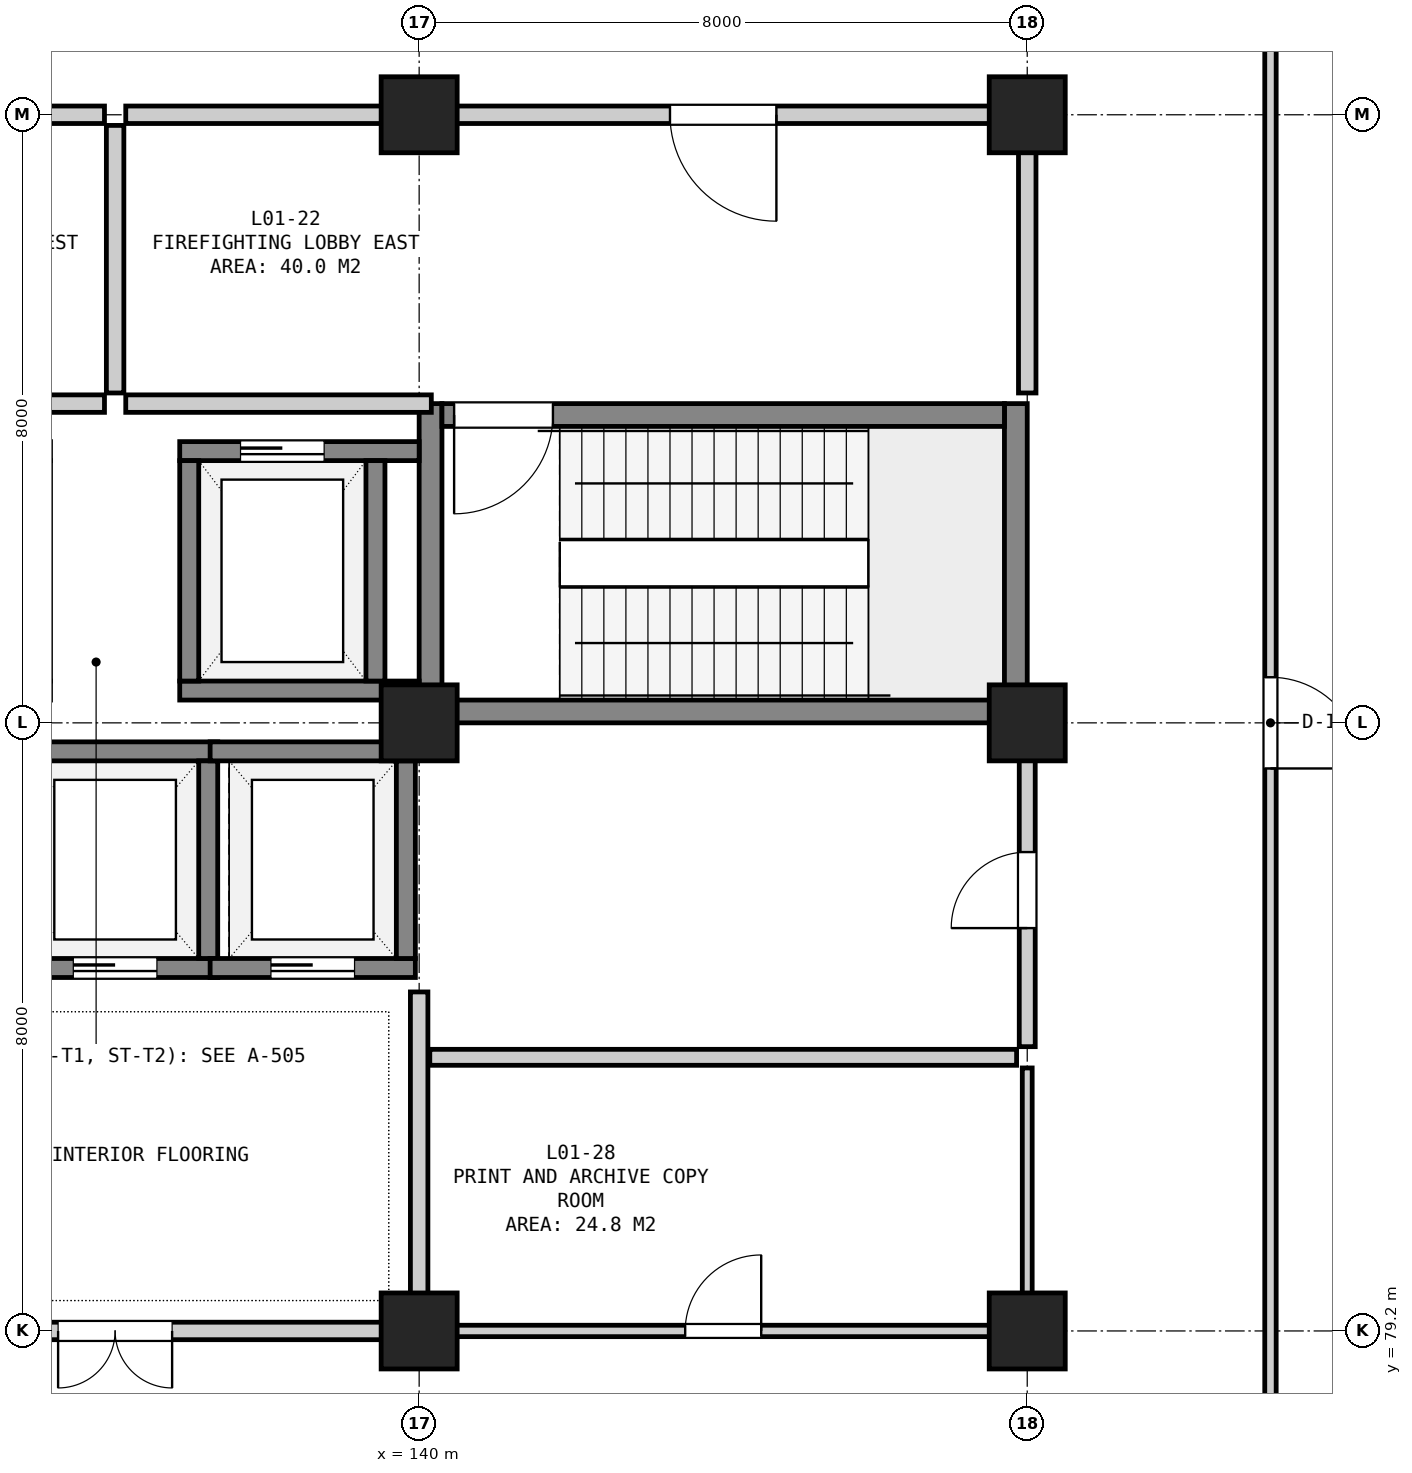
"""IFC4 building model, lengths in metres.
Left out: names, types, materials, properties, quantities, classifications, styles, units other than length and angle.
Written with IfcOpenShell. Run it as: python <this file> out.ifc"""

import sys

from ifc_helpers import new_model, si_unit, direction, frame, frame_2d, origin, origin_2d, place, context, subcontext, project, spatial, rectangle, extrude, element, fill, save


model = new_model("IFC4")
c1 = context("Model", 3, precision=1e-05, world=origin(), true_north=direction((0.0, 1.0)))
c2 = subcontext(c1, "Body", "Model", "MODEL_VIEW")
j1 = project(units=[si_unit("LENGTHUNIT", "METRE"), si_unit("PLANEANGLEUNIT", "RADIAN")], contexts=[c1])
p1 = place(None, origin())
s1 = spatial("IfcSite", under=j1, at=p1, CompositionType="ELEMENT")
p2 = place(p1, origin())
s2 = spatial("IfcBuilding", under=s1, at=p2, CompositionType="ELEMENT")
p3 = place(p2, frame((0.0, 0.0, 5.4)))
s3 = spatial("IfcBuildingStorey", under=s2, at=p3, CompositionType="ELEMENT", Elevation=5.4)
for number, where, z_axis, x_axis in (
    (1, (140.0, 79.2, 0.0), (0.0, 0.0, 1.0), (1.0, 0.0, 0.0)),
    (2, (140.0, 87.2, 0.0), (0.0, 0.0, 1.0), (1.0, 0.0, 0.0)),
    (3, (140.0, 95.2, 0.0), (0.0, 0.0, 1.0), (1.0, 0.0, 0.0)),
    (4, (148.0, 79.2, 0.0), (0.0, 0.0, 1.0), (1.0, 0.0, 0.0)),
    (5, (148.0, 87.2, 0.0), (0.0, 0.0, 1.0), (1.0, 0.0, 0.0)),
    (6, (148.0, 95.2, 0.0), (0.0, 0.0, 1.0), (1.0, 0.0, 0.0)),
):
    element("IfcColumn", number, at=place(p3, frame(where, z_axis=z_axis, x_axis=x_axis)), inside=s3, PredefinedType="COLUMN", context=c2, shape_type="SweptSolid", body=[
        extrude(rectangle(XDim=1.0, YDim=1.0, at=origin_2d()), origin(), (0.0, 0.0, 1.0), 5.4),
    ])
for number, where, z_axis, x_axis in (
    (7, (140.15, 87.2, 0.0), (0.0, 0.0, 1.0), (0.0, 1.0, 0.0)),
    (8, (147.85, 87.2, 0.0), (0.0, 0.0, 1.0), (0.0, 1.0, 0.0)),
):
    element("IfcWall", number, at=place(p3, frame(where, z_axis=z_axis, x_axis=x_axis)), inside=s3, PredefinedType="SHEAR", context=c2, shape_type="SweptSolid", body=[
        extrude(rectangle(XDim=4.2, YDim=0.3, at=frame_2d((2.1, 0.0))), origin(), (0.0, 0.0, 1.0), 5.1),
    ])
p4 = place(p3, frame((140.3, 87.35, 0.0), z_axis=(0.0, 0.0, 1.0), x_axis=(1.0, 0.0, 0.0)))
e9 = element("IfcWall", 9, at=p4, inside=s3, PredefinedType="SHEAR", context=c2, shape_type="SweptSolid", body=[
    extrude(rectangle(XDim=7.4, YDim=0.3, at=frame_2d((3.7, 0.0))), origin(), (0.0, 0.0, 1.0), 5.1),
])
p5 = place(p3, frame((140.3, 91.25, 0.0), z_axis=(0.0, 0.0, 1.0), x_axis=(1.0, 0.0, 0.0)))
e10 = element("IfcWall", 10, at=p5, inside=s3, PredefinedType="SHEAR", context=c2, shape_type="SweptSolid", body=[
    extrude(rectangle(XDim=7.4, YDim=0.3, at=frame_2d((3.7, 0.0))), origin(), (0.0, 0.0, 1.0), 5.1),
])
p6 = place(p5, frame((0.16, 0.0, 0.0)))
e11 = element("IfcOpeningElement", 11, at=p6, cuts=e10, PredefinedType="OPENING", context=c2, shape_type="SweptSolid", body=[
    extrude(rectangle(XDim=1.3, YDim=2.18, at=frame_2d((0.65, 1.09))), frame((0.0, 0.162, 0.0), z_axis=(0.0, -1.0, 0.0), x_axis=(1.0, 0.0, 0.0)), (0.0, 0.0, 1.0), 0.324),
])
p7 = place(p3, frame((136.85, 87.625, 0.0), z_axis=(0.0, 0.0, 1.0), x_axis=(1.0, 0.0, 0.0)))
e12 = element("IfcWall", 12, at=p7, inside=s3, PredefinedType="SHEAR", context=c2, shape_type="SweptSolid", body=[
    extrude(rectangle(XDim=3.15, YDim=0.25, at=frame_2d((1.575, 0.0))), origin(), (0.0, 0.0, 1.0), 5.1),
])
p8 = place(p3, frame((136.85, 90.775, 0.0), z_axis=(0.0, 0.0, 1.0), x_axis=(1.0, 0.0, 0.0)))
e13 = element("IfcWall", 13, at=p8, inside=s3, PredefinedType="SHEAR", context=c2, shape_type="SweptSolid", body=[
    extrude(rectangle(XDim=3.15, YDim=0.25, at=frame_2d((1.575, 0.0))), origin(), (0.0, 0.0, 1.0), 5.1),
])
p9 = place(p8, frame((0.8, 0.0, 0.0)))
e14 = element("IfcOpeningElement", 14, at=p9, cuts=e13, PredefinedType="OPENING", context=c2, shape_type="SweptSolid", body=[
    extrude(rectangle(XDim=1.1, YDim=2.15, at=frame_2d((0.55, 1.075))), frame((0.0, 0.137, 0.0), z_axis=(0.0, -1.0, 0.0), x_axis=(1.0, 0.0, 0.0)), (0.0, 0.0, 1.0), 0.274),
])
for number, where, z_axis, x_axis in (
    (15, (136.975, 87.75, 0.0), (0.0, 0.0, 1.0), (0.0, 1.0, 0.0)),
    (16, (139.425, 87.75, 0.0), (0.0, 0.0, 1.0), (0.0, 1.0, 0.0)),
):
    element("IfcWall", number, at=place(p3, frame(where, z_axis=z_axis, x_axis=x_axis)), inside=s3, PredefinedType="SHEAR", context=c2, shape_type="SweptSolid", body=[
        extrude(rectangle(XDim=2.9, YDim=0.25, at=frame_2d((1.45, 0.0))), origin(), (0.0, 0.0, 1.0), 5.1),
    ])
p10 = place(p3, frame((134.65, 83.975, 0.0), z_axis=(0.0, 0.0, 1.0), x_axis=(1.0, 0.0, 0.0)))
e17 = element("IfcWall", 17, at=p10, inside=s3, PredefinedType="SHEAR", context=c2, shape_type="SweptSolid", body=[
    extrude(rectangle(XDim=2.7, YDim=0.25, at=frame_2d((1.35, 0.0))), origin(), (0.0, 0.0, 1.0), 5.1),
])
p11 = place(p10, frame((0.8, 0.0, 0.0)))
e18 = element("IfcOpeningElement", 18, at=p11, cuts=e17, PredefinedType="OPENING", context=c2, shape_type="SweptSolid", body=[
    extrude(rectangle(XDim=1.1, YDim=2.15, at=frame_2d((0.55, 1.075))), frame((0.0, 0.137, 0.0), z_axis=(0.0, -1.0, 0.0), x_axis=(1.0, 0.0, 0.0)), (0.0, 0.0, 1.0), 0.274),
])
p12 = place(p3, frame((134.65, 86.825, 0.0), z_axis=(0.0, 0.0, 1.0), x_axis=(1.0, 0.0, 0.0)))
e19 = element("IfcWall", 19, at=p12, inside=s3, PredefinedType="SHEAR", context=c2, shape_type="SweptSolid", body=[
    extrude(rectangle(XDim=2.7, YDim=0.25, at=frame_2d((1.35, 0.0))), origin(), (0.0, 0.0, 1.0), 5.1),
])
p13 = place(p3, frame((137.225, 84.1, 0.0), z_axis=(0.0, 0.0, 1.0), x_axis=(0.0, 1.0, 0.0)))
e20 = element("IfcWall", 20, at=p13, inside=s3, PredefinedType="SHEAR", context=c2, shape_type="SweptSolid", body=[
    extrude(rectangle(XDim=2.6, YDim=0.25, at=frame_2d((1.3, 0.0))), origin(), (0.0, 0.0, 1.0), 5.1),
])
p14 = place(p3, frame((137.25, 83.975, 0.0), z_axis=(0.0, 0.0, 1.0), x_axis=(1.0, 0.0, 0.0)))
e21 = element("IfcWall", 21, at=p14, inside=s3, PredefinedType="SHEAR", context=c2, shape_type="SweptSolid", body=[
    extrude(rectangle(XDim=2.7, YDim=0.25, at=frame_2d((1.35, 0.0))), origin(), (0.0, 0.0, 1.0), 5.1),
])
p15 = place(p14, frame((0.8, 0.0, 0.0)))
e22 = element("IfcOpeningElement", 22, at=p15, cuts=e21, PredefinedType="OPENING", context=c2, shape_type="SweptSolid", body=[
    extrude(rectangle(XDim=1.1, YDim=2.15, at=frame_2d((0.55, 1.075))), frame((0.0, 0.137, 0.0), z_axis=(0.0, -1.0, 0.0), x_axis=(1.0, 0.0, 0.0)), (0.0, 0.0, 1.0), 0.274),
])
p16 = place(p3, frame((137.25, 86.825, 0.0), z_axis=(0.0, 0.0, 1.0), x_axis=(1.0, 0.0, 0.0)))
e23 = element("IfcWall", 23, at=p16, inside=s3, PredefinedType="SHEAR", context=c2, shape_type="SweptSolid", body=[
    extrude(rectangle(XDim=2.7, YDim=0.25, at=frame_2d((1.35, 0.0))), origin(), (0.0, 0.0, 1.0), 5.1),
])
p17 = place(p3, frame((139.825, 84.1, 0.0), z_axis=(0.0, 0.0, 1.0), x_axis=(0.0, 1.0, 0.0)))
e24 = element("IfcWall", 24, at=p17, inside=s3, PredefinedType="SHEAR", context=c2, shape_type="SweptSolid", body=[
    extrude(rectangle(XDim=2.6, YDim=0.25, at=frame_2d((1.3, 0.0))), origin(), (0.0, 0.0, 1.0), 5.1),
])
p18 = place(p3, frame((131.84, 91.4, 0.0), z_axis=(0.0, 0.0, 1.0), x_axis=(1.0, 0.0, 0.0)))
e25 = element("IfcWall", 25, at=p18, inside=s3, PredefinedType="SOLIDWALL", context=c2, shape_type="SweptSolid", body=[
    extrude(rectangle(XDim=4.02, YDim=0.23, at=frame_2d((2.01, 0.0))), origin(), (0.0, 0.0, 1.0), 5.1),
])
p19 = place(p3, frame((124.14, 95.2, 0.0), z_axis=(0.0, 0.0, 1.0), x_axis=(1.0, 0.0, 0.0)))
e26 = element("IfcWall", 26, at=p19, inside=s3, PredefinedType="SOLIDWALL", context=c2, shape_type="SweptSolid", body=[
    extrude(rectangle(XDim=11.72, YDim=0.23, at=frame_2d((5.86, 0.0))), origin(), (0.0, 0.0, 1.0), 4.535),
])
p20 = place(p19, frame((3.16, 0.0, 0.0)))
e27 = element("IfcOpeningElement", 27, at=p20, cuts=e26, PredefinedType="OPENING", context=c2, shape_type="SweptSolid", body=[
    extrude(rectangle(XDim=1.4, YDim=2.2, at=frame_2d((0.7, 1.1))), frame((0.0, 0.127, 0.0), z_axis=(0.0, -1.0, 0.0), x_axis=(1.0, 0.0, 0.0)), (0.0, 0.0, 1.0), 0.254),
])
p21 = place(p3, frame((136.0, 91.54, 0.0), z_axis=(0.0, 0.0, 1.0), x_axis=(0.0, 1.0, 0.0)))
e28 = element("IfcWall", 28, at=p21, inside=s3, PredefinedType="SOLIDWALL", context=c2, shape_type="SweptSolid", body=[
    extrude(rectangle(XDim=3.52, YDim=0.23, at=frame_2d((1.76, 0.0))), origin(), (0.0, 0.0, 1.0), 5.1),
])
p22 = place(p3, frame((136.14, 91.4, 0.0), z_axis=(0.0, 0.0, 1.0), x_axis=(1.0, 0.0, 0.0)))
e29 = element("IfcWall", 29, at=p22, inside=s3, PredefinedType="SOLIDWALL", context=c2, shape_type="SweptSolid", body=[
    extrude(rectangle(XDim=4.02, YDim=0.23, at=frame_2d((2.01, 0.0))), origin(), (0.0, 0.0, 1.0), 5.1),
])
p23 = place(p3, frame((136.14, 95.2, 0.0), z_axis=(0.0, 0.0, 1.0), x_axis=(1.0, 0.0, 0.0)))
e30 = element("IfcWall", 30, at=p23, inside=s3, PredefinedType="SOLIDWALL", context=c2, shape_type="SweptSolid", body=[
    extrude(rectangle(XDim=11.72, YDim=0.23, at=frame_2d((5.86, 0.0))), origin(), (0.0, 0.0, 1.0), 4.535),
])
p24 = place(p23, frame((7.16, 0.0, 0.0)))
e31 = element("IfcOpeningElement", 31, at=p24, cuts=e30, PredefinedType="OPENING", context=c2, shape_type="SweptSolid", body=[
    extrude(rectangle(XDim=1.4, YDim=2.2, at=frame_2d((0.7, 1.1))), frame((0.0, 0.127, 0.0), z_axis=(0.0, -1.0, 0.0), x_axis=(1.0, 0.0, 0.0)), (0.0, 0.0, 1.0), 0.254),
])
p25 = place(p3, frame((148.0, 91.54, 0.0), z_axis=(0.0, 0.0, 1.0), x_axis=(0.0, 1.0, 0.0)))
e32 = element("IfcWall", 32, at=p25, inside=s3, PredefinedType="SOLIDWALL", context=c2, shape_type="SweptSolid", body=[
    extrude(rectangle(XDim=3.52, YDim=0.23, at=frame_2d((1.76, 0.0))), origin(), (0.0, 0.0, 1.0), 4.485),
])
p26 = place(p3, frame((132.14, 79.2, 0.0), z_axis=(0.0, 0.0, 1.0), x_axis=(1.0, 0.0, 0.0)))
e33 = element("IfcWall", 33, at=p26, inside=s3, PredefinedType="SOLIDWALL", context=c2, shape_type="SweptSolid", body=[
    extrude(rectangle(XDim=7.72, YDim=0.23, at=frame_2d((3.86, 0.0))), origin(), (0.0, 0.0, 1.0), 4.485),
])
p27 = place(p26, frame((3.11, 0.0, 0.0)))
e34 = element("IfcOpeningElement", 34, at=p27, cuts=e33, PredefinedType="OPENING", context=c2, shape_type="SweptSolid", body=[
    extrude(rectangle(XDim=1.5, YDim=2.2, at=frame_2d((0.75, 1.1))), frame((0.0, 0.127, 0.0), z_axis=(0.0, -1.0, 0.0), x_axis=(1.0, 0.0, 0.0)), (0.0, 0.0, 1.0), 0.254),
])
p28 = place(p3, frame((140.0, 79.34, 0.0), z_axis=(0.0, 0.0, 1.0), x_axis=(0.0, 1.0, 0.0)))
e35 = element("IfcWall", 35, at=p28, inside=s3, PredefinedType="SOLIDWALL", context=c2, shape_type="SweptSolid", body=[
    extrude(rectangle(XDim=4.32, YDim=0.23, at=frame_2d((2.16, 0.0))), origin(), (0.0, 0.0, 1.0), 4.435),
])
p29 = place(p3, frame((140.14, 82.8, 0.0), z_axis=(0.0, 0.0, 1.0), x_axis=(1.0, 0.0, 0.0)))
e36 = element("IfcWall", 36, at=p29, inside=s3, PredefinedType="SOLIDWALL", context=c2, shape_type="SweptSolid", body=[
    extrude(rectangle(XDim=7.72, YDim=0.21, at=frame_2d((3.86, 0.0))), origin(), (0.0, 0.0, 1.0), 5.1),
])
p30 = place(p3, frame((148.0, 82.94, 0.0), z_axis=(0.0, 0.0, 1.0), x_axis=(0.0, 1.0, 0.0)))
e37 = element("IfcWall", 37, at=p30, inside=s3, PredefinedType="SOLIDWALL", context=c2, shape_type="SweptSolid", body=[
    extrude(rectangle(XDim=4.12, YDim=0.21, at=frame_2d((2.06, 0.0))), origin(), (0.0, 0.0, 1.0), 4.435),
])
p31 = place(p30, frame((1.56, 0.0, 0.0)))
e38 = element("IfcOpeningElement", 38, at=p31, cuts=e37, PredefinedType="OPENING", context=c2, shape_type="SweptSolid", body=[
    extrude(rectangle(XDim=1.0, YDim=2.15, at=frame_2d((0.5, 1.075))), frame((0.0, 0.117, 0.0), z_axis=(0.0, -1.0, 0.0), x_axis=(1.0, 0.0, 0.0)), (0.0, 0.0, 1.0), 0.234),
])
p32 = place(p3, frame((140.14, 79.2, 0.0), z_axis=(0.0, 0.0, 1.0), x_axis=(1.0, 0.0, 0.0)))
e39 = element("IfcWall", 39, at=p32, inside=s3, PredefinedType="PARTITIONING", context=c2, shape_type="SweptSolid", body=[
    extrude(rectangle(XDim=7.72, YDim=0.15, at=frame_2d((3.86, 0.0))), origin(), (0.0, 0.0, 1.0), 4.535),
])
p33 = place(p32, frame((3.36, 0.0, 0.0)))
e40 = element("IfcOpeningElement", 40, at=p33, cuts=e39, PredefinedType="OPENING", context=c2, shape_type="SweptSolid", body=[
    extrude(rectangle(XDim=1.0, YDim=2.15, at=frame_2d((0.5, 1.075))), frame((0.0, 0.087, 0.0), z_axis=(0.0, -1.0, 0.0), x_axis=(1.0, 0.0, 0.0)), (0.0, 0.0, 1.0), 0.174),
])
p34 = place(p3, frame((148.0, 79.34, 0.0), z_axis=(0.0, 0.0, 1.0), x_axis=(0.0, 1.0, 0.0)))
e41 = element("IfcWall", 41, at=p34, inside=s3, PredefinedType="PARTITIONING", context=c2, shape_type="SweptSolid", body=[
    extrude(rectangle(XDim=3.32, YDim=0.13, at=frame_2d((1.66, 0.0))), origin(), (0.0, 0.0, 1.0), 4.435),
])
p35 = place(p3, frame((151.2, 76.14, 0.0), z_axis=(0.0, 0.0, 1.0), x_axis=(0.0, 1.0, 0.0)))
e42 = element("IfcWall", 42, at=p35, inside=s3, PredefinedType="PARTITIONING", context=c2, shape_type="SweptSolid", body=[
    extrude(rectangle(XDim=22.12, YDim=0.15, at=frame_2d((11.06, 0.0))), origin(), (0.0, 0.0, 1.0), 5.1),
])
p36 = place(p35, frame((10.46, 0.0, 0.0)))
e43 = element("IfcOpeningElement", 43, at=p36, cuts=e42, PredefinedType="OPENING", context=c2, shape_type="SweptSolid", body=[
    extrude(rectangle(XDim=1.2, YDim=2.15, at=frame_2d((0.6, 1.075))), frame((0.0, 0.087, 0.0), z_axis=(0.0, -1.0, 0.0), x_axis=(1.0, 0.0, 0.0)), (0.0, 0.0, 1.0), 0.174),
])
p37 = place(p6, frame((1.3, 0.0, 0.0), z_axis=(0.0, 0.0, 1.0), x_axis=(-1.0, 0.0, 0.0)))
e44 = element("IfcDoor", 44, at=p37, inside=s3, OperationType="SINGLE_SWING_RIGHT", PredefinedType="DOOR", context=c2, shape_type="SweptSolid", body=[
    extrude(rectangle(XDim=1.3, YDim=2.18, at=frame_2d((0.65, 1.09))), frame((0.0, 0.025, 0.0), z_axis=(0.0, -1.0, 0.0), x_axis=(1.0, 0.0, 0.0)), (0.0, 0.0, 1.0), 0.05),
])
fill(e11, e44)
p38 = place(p9, origin())
e45 = element("IfcDoor", 45, at=p38, inside=s3, OperationType="SLIDING_TO_LEFT", PredefinedType="DOOR", context=c2, shape_type="SweptSolid", body=[
    extrude(rectangle(XDim=1.1, YDim=2.15, at=frame_2d((0.55, 1.075))), frame((0.0, 0.025, 0.0), z_axis=(0.0, -1.0, 0.0), x_axis=(1.0, 0.0, 0.0)), (0.0, 0.0, 1.0), 0.05),
])
fill(e14, e45)
p39 = place(p11, origin())
e46 = element("IfcDoor", 46, at=p39, inside=s3, OperationType="SLIDING_TO_LEFT", PredefinedType="DOOR", context=c2, shape_type="SweptSolid", body=[
    extrude(rectangle(XDim=1.1, YDim=2.15, at=frame_2d((0.55, 1.075))), frame((0.0, 0.025, 0.0), z_axis=(0.0, -1.0, 0.0), x_axis=(1.0, 0.0, 0.0)), (0.0, 0.0, 1.0), 0.05),
])
fill(e18, e46)
p40 = place(p15, origin())
e47 = element("IfcDoor", 47, at=p40, inside=s3, OperationType="SLIDING_TO_LEFT", PredefinedType="DOOR", context=c2, shape_type="SweptSolid", body=[
    extrude(rectangle(XDim=1.1, YDim=2.15, at=frame_2d((0.55, 1.075))), frame((0.0, 0.025, 0.0), z_axis=(0.0, -1.0, 0.0), x_axis=(1.0, 0.0, 0.0)), (0.0, 0.0, 1.0), 0.05),
])
fill(e22, e47)
p41 = place(p24, frame((1.4, 0.0, 0.0), z_axis=(0.0, 0.0, 1.0), x_axis=(-1.0, 0.0, 0.0)))
e48 = element("IfcDoor", 48, at=p41, inside=s3, OperationType="SINGLE_SWING_LEFT", PredefinedType="DOOR", context=c2, shape_type="SweptSolid", body=[
    extrude(rectangle(XDim=1.4, YDim=2.2, at=frame_2d((0.7, 1.1))), frame((0.0, 0.025, 0.0), z_axis=(0.0, -1.0, 0.0), x_axis=(1.0, 0.0, 0.0)), (0.0, 0.0, 1.0), 0.05),
])
fill(e31, e48)
p42 = place(p27, frame((1.5, 0.0, 0.0), z_axis=(0.0, 0.0, 1.0), x_axis=(-1.0, 0.0, 0.0)))
e49 = element("IfcDoor", 49, at=p42, inside=s3, OperationType="DOUBLE_DOOR_SINGLE_SWING", PredefinedType="DOOR", context=c2, shape_type="SweptSolid", body=[
    extrude(rectangle(XDim=1.5, YDim=2.2, at=frame_2d((0.75, 1.1))), frame((0.0, 0.025, 0.0), z_axis=(0.0, -1.0, 0.0), x_axis=(1.0, 0.0, 0.0)), (0.0, 0.0, 1.0), 0.05),
])
fill(e34, e49)
p43 = place(p31, origin())
e50 = element("IfcDoor", 50, at=p43, inside=s3, OperationType="SINGLE_SWING_LEFT", PredefinedType="DOOR", context=c2, shape_type="SweptSolid", body=[
    extrude(rectangle(XDim=1.0, YDim=2.15, at=frame_2d((0.5, 1.075))), frame((0.0, 0.025, 0.0), z_axis=(0.0, -1.0, 0.0), x_axis=(1.0, 0.0, 0.0)), (0.0, 0.0, 1.0), 0.05),
])
fill(e38, e50)
p44 = place(p33, origin())
e51 = element("IfcDoor", 51, at=p44, inside=s3, OperationType="SINGLE_SWING_RIGHT", PredefinedType="DOOR", context=c2, shape_type="SweptSolid", body=[
    extrude(rectangle(XDim=1.0, YDim=2.15, at=frame_2d((0.5, 1.075))), frame((0.0, 0.025, 0.0), z_axis=(0.0, -1.0, 0.0), x_axis=(1.0, 0.0, 0.0)), (0.0, 0.0, 1.0), 0.05),
])
fill(e40, e51)
p45 = place(p36, frame((1.2, 0.0, 0.0), z_axis=(0.0, 0.0, 1.0), x_axis=(-1.0, 0.0, 0.0)))
e52 = element("IfcDoor", 52, at=p45, inside=s3, OperationType="SINGLE_SWING_RIGHT", PredefinedType="DOOR", context=c2, shape_type="SweptSolid", body=[
    extrude(rectangle(XDim=1.2, YDim=2.15, at=frame_2d((0.6, 1.075))), frame((0.0, 0.025, 0.0), z_axis=(0.0, -1.0, 0.0), x_axis=(1.0, 0.0, 0.0)), (0.0, 0.0, 1.0), 0.05),
])
fill(e43, e52)
save(model, sys.argv[1])
